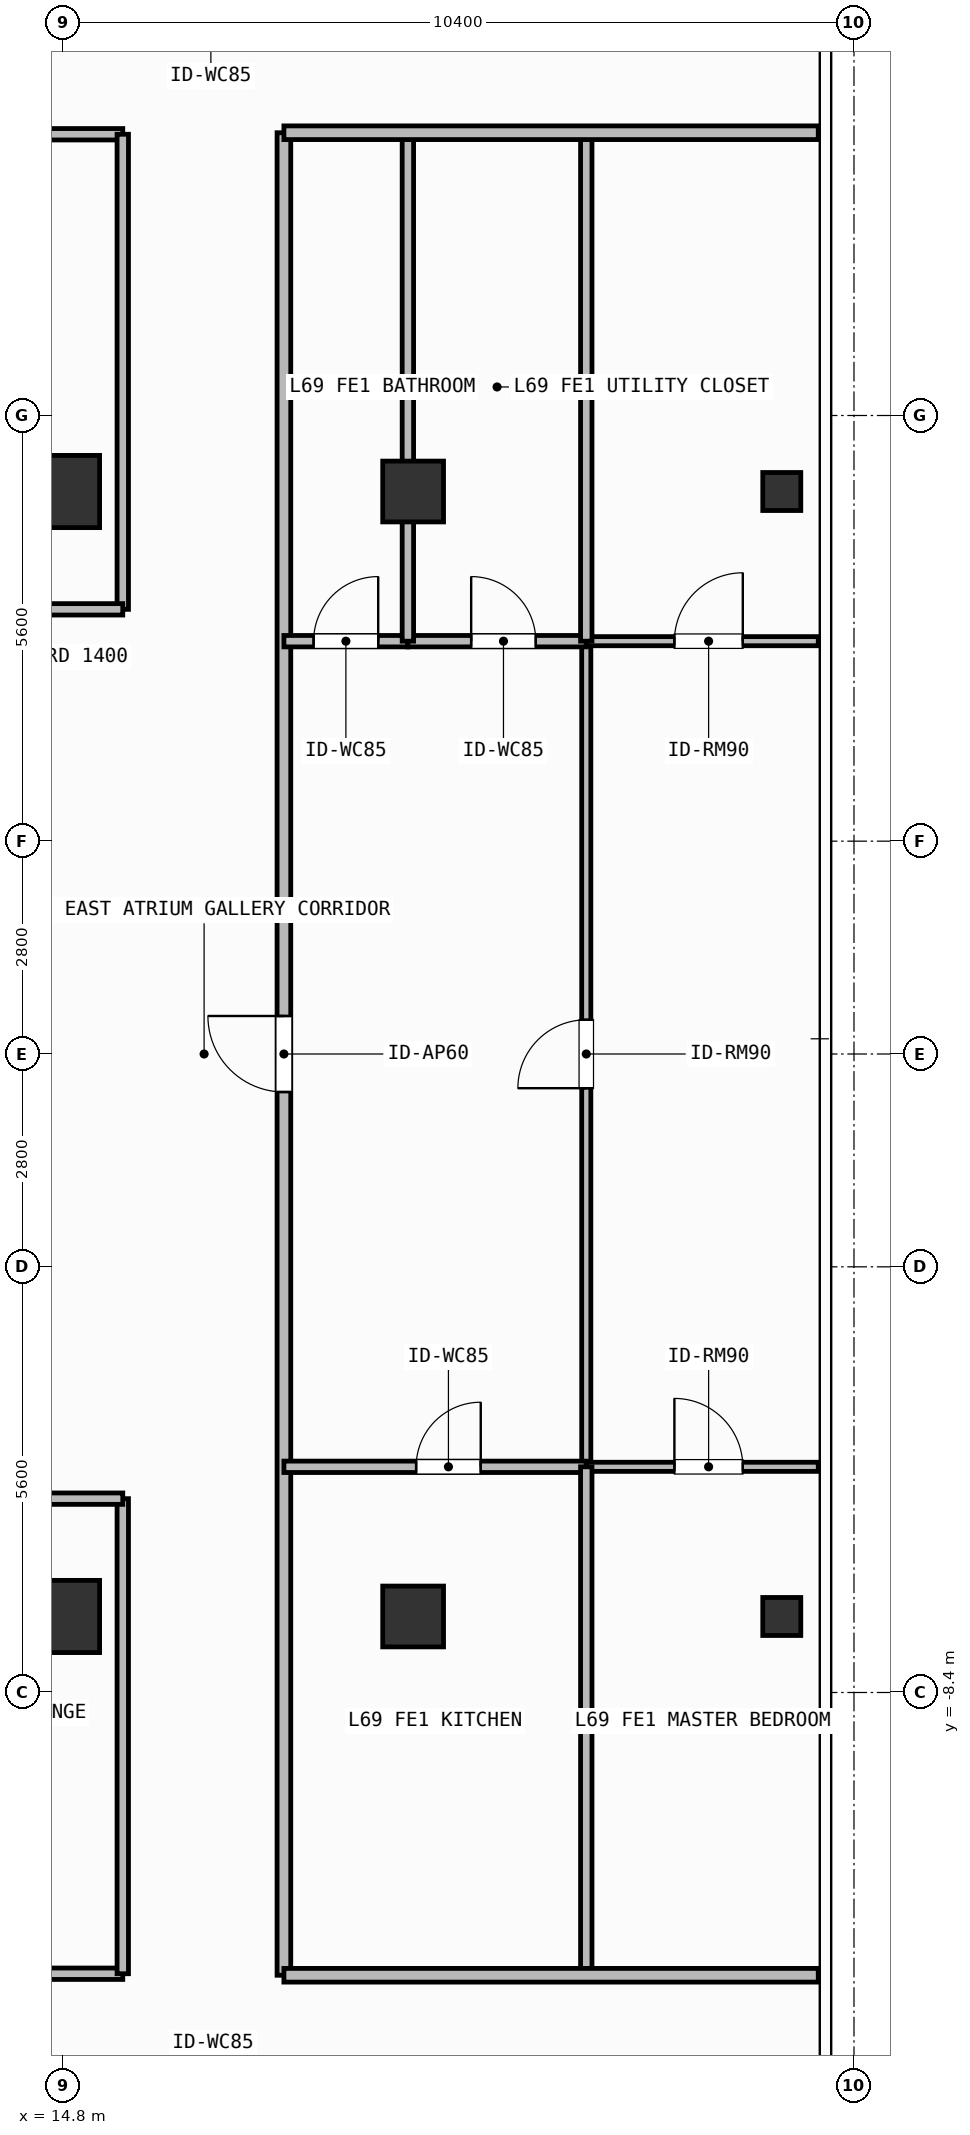
"""IFC4 building model, lengths in metres.
Left out: names, types, materials, properties, quantities, classifications, styles, units other than length and angle.
Written with IfcOpenShell. Run it as: python <this file> out.ifc"""

import sys

from ifc_helpers import new_model, si_unit, direction, frame, frame_2d, origin, origin_2d, place, context, subcontext, project, spatial, rectangle, hollow_rectangle, extrude, element, fill, save


model = new_model("IFC4")
c1 = context("Model", 3, precision=1e-05, world=origin(), true_north=direction((0.0, 1.0)))
c2 = subcontext(c1, "Body", "Model", "MODEL_VIEW")
j1 = project(units=[si_unit("LENGTHUNIT", "METRE"), si_unit("PLANEANGLEUNIT", "RADIAN")], contexts=[c1])
p1 = place(None, origin())
s1 = spatial("IfcSite", under=j1, at=p1, CompositionType="ELEMENT")
p2 = place(p1, origin())
s2 = spatial("IfcBuilding", under=s1, at=p2, CompositionType="ELEMENT")
p3 = place(p2, frame((0.0, 0.0, 282.0)))
s3 = spatial("IfcBuildingStorey", under=s2, at=p3, CompositionType="ELEMENT", Elevation=282.0)
for number, where, z_axis, x_axis in (
    (1, (14.8, -7.4, 0.0), (0.0, 0.0, 1.0), (1.0, 0.0, 0.0)),
    (2, (14.8, 7.4, 0.0), (0.0, 0.0, 1.0), (1.0, 0.0, 0.0)),
):
    element("IfcColumn", number, at=place(p3, frame(where, z_axis=z_axis, x_axis=x_axis)), inside=s3, PredefinedType="COLUMN", context=c2, shape_type="SweptSolid", body=[
        extrude(rectangle(XDim=0.95, YDim=0.95, at=origin_2d()), origin(), (0.0, 0.0, 1.0), 3.9),
    ])
for number, where, z_axis, x_axis in (
    (3, (19.4, -7.4, 0.0), (0.0, 0.0, 1.0), (1.0, 0.0, 0.0)),
    (4, (19.4, 7.4, 0.0), (0.0, 0.0, 1.0), (1.0, 0.0, 0.0)),
):
    element("IfcColumn", number, at=place(p3, frame(where, z_axis=z_axis, x_axis=x_axis)), inside=s3, PredefinedType="COLUMN", context=c2, shape_type="SweptSolid", body=[
        extrude(hollow_rectangle(XDim=0.8, YDim=0.8, WallThickness=0.036, at=origin_2d()), origin(), (0.0, 0.0, 1.0), 3.9),
    ])
for number, where, z_axis, x_axis in (
    (5, (24.25, -7.4, 0.0), (0.0, 0.0, 1.0), (1.0, 0.0, 0.0)),
    (6, (24.25, 7.4, 0.0), (0.0, 0.0, 1.0), (1.0, 0.0, 0.0)),
):
    element("IfcColumn", number, at=place(p3, frame(where, z_axis=z_axis, x_axis=x_axis)), inside=s3, PredefinedType="COLUMN", context=c2, shape_type="SweptSolid", body=[
        extrude(hollow_rectangle(XDim=0.5, YDim=0.5, WallThickness=0.025, at=origin_2d()), origin(), (0.0, 0.0, 1.0), 3.9),
    ])
p4 = place(p3, frame((10.1, -12.1, 0.0), z_axis=(0.0, 0.0, 1.0), x_axis=(1.0, 0.0, 0.0)))
e7 = element("IfcWall", 7, at=p4, inside=s3, PredefinedType="PARTITIONING", context=c2, shape_type="SweptSolid", body=[
    extrude(rectangle(XDim=5.48, YDim=0.15, at=frame_2d((2.74, 0.0))), origin(), (0.0, 0.0, 1.0), 3.62),
])
p5 = place(p4, frame((2.29, 0.0, 0.0)))
e8 = element("IfcOpeningElement", 8, at=p5, cuts=e7, PredefinedType="OPENING", context=c2, shape_type="SweptSolid", body=[
    extrude(rectangle(XDim=0.9, YDim=2.1, at=frame_2d((0.45, 1.05))), frame((0.0, 0.085, 0.0), z_axis=(0.0, -1.0, 0.0), x_axis=(1.0, 0.0, 0.0)), (0.0, 0.0, 1.0), 0.17),
])
p6 = place(p3, frame((8.36, 12.1, 0.0), z_axis=(0.0, 0.0, 1.0), x_axis=(1.0, 0.0, 0.0)))
e9 = element("IfcWall", 9, at=p6, inside=s3, PredefinedType="PARTITIONING", context=c2, shape_type="SweptSolid", body=[
    extrude(rectangle(XDim=7.22, YDim=0.15, at=frame_2d((3.61, 0.0))), origin(), (0.0, 0.0, 1.0), 3.62),
])
p7 = place(p6, frame((3.513, 0.0, 0.0)))
e10 = element("IfcOpeningElement", 10, at=p7, cuts=e9, PredefinedType="OPENING", context=c2, shape_type="SweptSolid", body=[
    extrude(rectangle(XDim=0.9, YDim=2.1, at=frame_2d((0.45, 1.05))), frame((0.0, 0.085, 0.0), z_axis=(0.0, -1.0, 0.0), x_axis=(1.0, 0.0, 0.0)), (0.0, 0.0, 1.0), 0.17),
])
p8 = place(p3, frame((17.7, -12.12, 0.0), z_axis=(0.0, 0.0, 1.0), x_axis=(0.0, 1.0, 0.0)))
e11 = element("IfcWall", 11, at=p8, inside=s3, PredefinedType="PARTITIONING", context=c2, shape_type="SweptSolid", body=[
    extrude(rectangle(XDim=24.24, YDim=0.18, at=frame_2d((12.12, 0.0))), origin(), (0.0, 0.0, 1.0), 3.62),
])
p9 = place(p8, frame((11.62, 0.0, 0.0)))
e12 = element("IfcOpeningElement", 12, at=p9, cuts=e11, PredefinedType="OPENING", context=c2, shape_type="SweptSolid", body=[
    extrude(rectangle(XDim=1.0, YDim=2.2, at=frame_2d((0.5, 1.1))), frame((0.0, 0.1, 0.0), z_axis=(0.0, -1.0, 0.0), x_axis=(1.0, 0.0, 0.0)), (0.0, 0.0, 1.0), 0.2),
])
p10 = place(p3, frame((21.678, -5.431, 0.0), z_axis=(0.0, 0.0, 1.0), x_axis=(0.0, 1.0, 0.0)))
e13 = element("IfcWall", 13, at=p10, inside=s3, PredefinedType="PARTITIONING", context=c2, shape_type="SweptSolid", body=[
    extrude(rectangle(XDim=10.862, YDim=0.12, at=frame_2d((5.431, 0.0))), origin(), (0.0, 0.0, 1.0), 3.62),
])
p11 = place(p10, frame((4.981, 0.0, 0.0)))
e14 = element("IfcOpeningElement", 14, at=p11, cuts=e13, PredefinedType="OPENING", context=c2, shape_type="SweptSolid", body=[
    extrude(rectangle(XDim=0.9, YDim=2.1, at=frame_2d((0.45, 1.05))), frame((0.0, 0.07, 0.0), z_axis=(0.0, -1.0, 0.0), x_axis=(1.0, 0.0, 0.0)), (0.0, 0.0, 1.0), 0.14),
])
p12 = place(p3, frame((17.7, 5.431, 0.0), z_axis=(0.0, 0.0, 1.0), x_axis=(1.0, 0.0, 0.0)))
e15 = element("IfcWall", 15, at=p12, inside=s3, PredefinedType="PARTITIONING", context=c2, shape_type="SweptSolid", body=[
    extrude(rectangle(XDim=1.631, YDim=0.15, at=frame_2d((0.815, 0.0))), origin(), (0.0, 0.0, 1.0), 3.62),
])
p13 = place(p12, frame((0.39, 0.0, 0.0)))
e16 = element("IfcOpeningElement", 16, at=p13, cuts=e15, PredefinedType="OPENING", context=c2, shape_type="SweptSolid", body=[
    extrude(rectangle(XDim=0.85, YDim=2.1, at=frame_2d((0.425, 1.05))), frame((0.0, 0.085, 0.0), z_axis=(0.0, -1.0, 0.0), x_axis=(1.0, 0.0, 0.0)), (0.0, 0.0, 1.0), 0.17),
])
p14 = place(p3, frame((19.331, 5.431, 0.0), z_axis=(0.0, 0.0, 1.0), x_axis=(1.0, 0.0, 0.0)))
e17 = element("IfcWall", 17, at=p14, inside=s3, PredefinedType="PARTITIONING", context=c2, shape_type="SweptSolid", body=[
    extrude(rectangle(XDim=2.347, YDim=0.15, at=frame_2d((1.173, 0.0))), origin(), (0.0, 0.0, 1.0), 3.62),
])
p15 = place(p14, frame((0.833, 0.0, 0.0)))
e18 = element("IfcOpeningElement", 18, at=p15, cuts=e17, PredefinedType="OPENING", context=c2, shape_type="SweptSolid", body=[
    extrude(rectangle(XDim=0.85, YDim=2.1, at=frame_2d((0.425, 1.05))), frame((0.0, 0.085, 0.0), z_axis=(0.0, -1.0, 0.0), x_axis=(1.0, 0.0, 0.0)), (0.0, 0.0, 1.0), 0.17),
])
p16 = place(p3, frame((17.7, -5.431, 0.0), z_axis=(0.0, 0.0, 1.0), x_axis=(1.0, 0.0, 0.0)))
e19 = element("IfcWall", 19, at=p16, inside=s3, PredefinedType="PARTITIONING", context=c2, shape_type="SweptSolid", body=[
    extrude(rectangle(XDim=3.978, YDim=0.15, at=frame_2d((1.989, 0.0))), origin(), (0.0, 0.0, 1.0), 3.62),
])
p17 = place(p16, frame((1.74, 0.0, 0.0)))
e20 = element("IfcOpeningElement", 20, at=p17, cuts=e19, PredefinedType="OPENING", context=c2, shape_type="SweptSolid", body=[
    extrude(rectangle(XDim=0.85, YDim=2.1, at=frame_2d((0.425, 1.05))), frame((0.0, 0.085, 0.0), z_axis=(0.0, -1.0, 0.0), x_axis=(1.0, 0.0, 0.0)), (0.0, 0.0, 1.0), 0.17),
])
p18 = place(p3, frame((21.678, -5.431, 0.0), z_axis=(0.0, 0.0, 1.0), x_axis=(1.0, 0.0, 0.0)))
e21 = element("IfcWall", 21, at=p18, inside=s3, PredefinedType="PARTITIONING", context=c2, shape_type="SweptSolid", body=[
    extrude(rectangle(XDim=3.052, YDim=0.12, at=frame_2d((1.526, 0.0))), origin(), (0.0, 0.0, 1.0), 3.62),
])
p19 = place(p18, frame((1.159, 0.0, 0.0)))
e22 = element("IfcOpeningElement", 22, at=p19, cuts=e21, PredefinedType="OPENING", context=c2, shape_type="SweptSolid", body=[
    extrude(rectangle(XDim=0.9, YDim=2.1, at=frame_2d((0.45, 1.05))), frame((0.0, 0.07, 0.0), z_axis=(0.0, -1.0, 0.0), x_axis=(1.0, 0.0, 0.0)), (0.0, 0.0, 1.0), 0.14),
])
p20 = place(p3, frame((21.678, 5.431, 0.0), z_axis=(0.0, 0.0, 1.0), x_axis=(1.0, 0.0, 0.0)))
e23 = element("IfcWall", 23, at=p20, inside=s3, PredefinedType="PARTITIONING", context=c2, shape_type="SweptSolid", body=[
    extrude(rectangle(XDim=3.052, YDim=0.12, at=frame_2d((1.526, 0.0))), origin(), (0.0, 0.0, 1.0), 3.62),
])
p21 = place(p20, frame((1.159, 0.0, 0.0)))
e24 = element("IfcOpeningElement", 24, at=p21, cuts=e23, PredefinedType="OPENING", context=c2, shape_type="SweptSolid", body=[
    extrude(rectangle(XDim=0.9, YDim=2.1, at=frame_2d((0.45, 1.05))), frame((0.0, 0.07, 0.0), z_axis=(0.0, -1.0, 0.0), x_axis=(1.0, 0.0, 0.0)), (0.0, 0.0, 1.0), 0.14),
])
p22 = place(p3, frame((15.58, -12.1, 0.0), z_axis=(0.0, 0.0, 1.0), x_axis=(0.0, 1.0, 0.0)))
e25 = element("IfcWall", 25, at=p22, inside=s3, PredefinedType="PARTITIONING", context=c2, shape_type="SweptSolid", body=[
    extrude(rectangle(XDim=6.25, YDim=0.15, at=frame_2d((3.125, 0.0))), origin(), (0.0, 0.0, 1.0), 3.62),
])
p23 = place(p3, frame((8.96, -5.85, 0.0), z_axis=(0.0, 0.0, 1.0), x_axis=(1.0, 0.0, 0.0)))
e26 = element("IfcWall", 26, at=p23, inside=s3, PredefinedType="PARTITIONING", context=c2, shape_type="SweptSolid", body=[
    extrude(rectangle(XDim=6.62, YDim=0.15, at=frame_2d((3.31, 0.0))), origin(), (0.0, 0.0, 1.0), 3.62),
])
p24 = place(p3, frame((15.58, 5.85, 0.0), z_axis=(0.0, 0.0, 1.0), x_axis=(0.0, 1.0, 0.0)))
e27 = element("IfcWall", 27, at=p24, inside=s3, PredefinedType="PARTITIONING", context=c2, shape_type="SweptSolid", body=[
    extrude(rectangle(XDim=6.25, YDim=0.15, at=frame_2d((3.125, 0.0))), origin(), (0.0, 0.0, 1.0), 3.62),
])
p25 = place(p3, frame((8.96, 5.85, 0.0), z_axis=(0.0, 0.0, 1.0), x_axis=(1.0, 0.0, 0.0)))
e28 = element("IfcWall", 28, at=p25, inside=s3, PredefinedType="PARTITIONING", context=c2, shape_type="SweptSolid", body=[
    extrude(rectangle(XDim=6.62, YDim=0.15, at=frame_2d((3.31, 0.0))), origin(), (0.0, 0.0, 1.0), 3.62),
])
for number, where, z_axis, x_axis in (
    (29, (19.331, 5.431, 0.0), (0.0, 0.0, 1.0), (0.0, 1.0, 0.0)),
    (30, (21.678, -12.12, 0.0), (0.0, 0.0, 1.0), (0.0, 1.0, 0.0)),
    (31, (21.678, 5.431, 0.0), (0.0, 0.0, 1.0), (0.0, 1.0, 0.0)),
):
    element("IfcWall", number, at=place(p3, frame(where, z_axis=z_axis, x_axis=x_axis)), inside=s3, PredefinedType="PARTITIONING", context=c2, shape_type="SweptSolid", body=[
        extrude(rectangle(XDim=6.689, YDim=0.15, at=frame_2d((3.345, 0.0))), origin(), (0.0, 0.0, 1.0), 3.62),
    ])
for number, where, z_axis, x_axis in (
    (32, (17.7, -12.12, 0.0), (0.0, 0.0, 1.0), (1.0, 0.0, 0.0)),
    (33, (17.7, 12.12, 0.0), (0.0, 0.0, 1.0), (1.0, 0.0, 0.0)),
):
    element("IfcWall", number, at=place(p3, frame(where, z_axis=z_axis, x_axis=x_axis)), inside=s3, PredefinedType="PARTITIONING", context=c2, shape_type="SweptSolid", body=[
        extrude(rectangle(XDim=7.03, YDim=0.18, at=frame_2d((3.515, 0.0))), origin(), (0.0, 0.0, 1.0), 3.62),
    ])
p26 = place(p9, origin())
e34 = element("IfcDoor", 34, at=p26, inside=s3, OperationType="SINGLE_SWING_RIGHT", PredefinedType="DOOR", context=c2, shape_type="SweptSolid", body=[
    extrude(rectangle(XDim=1.0, YDim=2.2, at=frame_2d((0.5, 1.1))), frame((0.0, 0.025, 0.0), z_axis=(0.0, -1.0, 0.0), x_axis=(1.0, 0.0, 0.0)), (0.0, 0.0, 1.0), 0.05),
])
fill(e12, e34)
p27 = place(p11, origin())
e35 = element("IfcDoor", 35, at=p27, inside=s3, OperationType="SINGLE_SWING_LEFT", PredefinedType="DOOR", context=c2, shape_type="SweptSolid", body=[
    extrude(rectangle(XDim=0.9, YDim=2.1, at=frame_2d((0.45, 1.05))), frame((0.0, 0.025, 0.0), z_axis=(0.0, -1.0, 0.0), x_axis=(1.0, 0.0, 0.0)), (0.0, 0.0, 1.0), 0.05),
])
fill(e14, e35)
p28 = place(p13, origin())
e36 = element("IfcDoor", 36, at=p28, inside=s3, OperationType="SINGLE_SWING_RIGHT", PredefinedType="DOOR", context=c2, shape_type="SweptSolid", body=[
    extrude(rectangle(XDim=0.85, YDim=2.1, at=frame_2d((0.425, 1.05))), frame((0.0, 0.025, 0.0), z_axis=(0.0, -1.0, 0.0), x_axis=(1.0, 0.0, 0.0)), (0.0, 0.0, 1.0), 0.05),
])
fill(e16, e36)
p29 = place(p15, origin())
e37 = element("IfcDoor", 37, at=p29, inside=s3, OperationType="SINGLE_SWING_LEFT", PredefinedType="DOOR", context=c2, shape_type="SweptSolid", body=[
    extrude(rectangle(XDim=0.85, YDim=2.1, at=frame_2d((0.425, 1.05))), frame((0.0, 0.025, 0.0), z_axis=(0.0, -1.0, 0.0), x_axis=(1.0, 0.0, 0.0)), (0.0, 0.0, 1.0), 0.05),
])
fill(e18, e37)
p30 = place(p17, origin())
e38 = element("IfcDoor", 38, at=p30, inside=s3, OperationType="SINGLE_SWING_RIGHT", PredefinedType="DOOR", context=c2, shape_type="SweptSolid", body=[
    extrude(rectangle(XDim=0.85, YDim=2.1, at=frame_2d((0.425, 1.05))), frame((0.0, 0.025, 0.0), z_axis=(0.0, -1.0, 0.0), x_axis=(1.0, 0.0, 0.0)), (0.0, 0.0, 1.0), 0.05),
])
fill(e20, e38)
p31 = place(p19, origin())
e39 = element("IfcDoor", 39, at=p31, inside=s3, OperationType="SINGLE_SWING_LEFT", PredefinedType="DOOR", context=c2, shape_type="SweptSolid", body=[
    extrude(rectangle(XDim=0.9, YDim=2.1, at=frame_2d((0.45, 1.05))), frame((0.0, 0.025, 0.0), z_axis=(0.0, -1.0, 0.0), x_axis=(1.0, 0.0, 0.0)), (0.0, 0.0, 1.0), 0.05),
])
fill(e22, e39)
p32 = place(p21, origin())
e40 = element("IfcDoor", 40, at=p32, inside=s3, OperationType="SINGLE_SWING_RIGHT", PredefinedType="DOOR", context=c2, shape_type="SweptSolid", body=[
    extrude(rectangle(XDim=0.9, YDim=2.1, at=frame_2d((0.45, 1.05))), frame((0.0, 0.025, 0.0), z_axis=(0.0, -1.0, 0.0), x_axis=(1.0, 0.0, 0.0)), (0.0, 0.0, 1.0), 0.05),
])
fill(e24, e40)
save(model, sys.argv[1])
